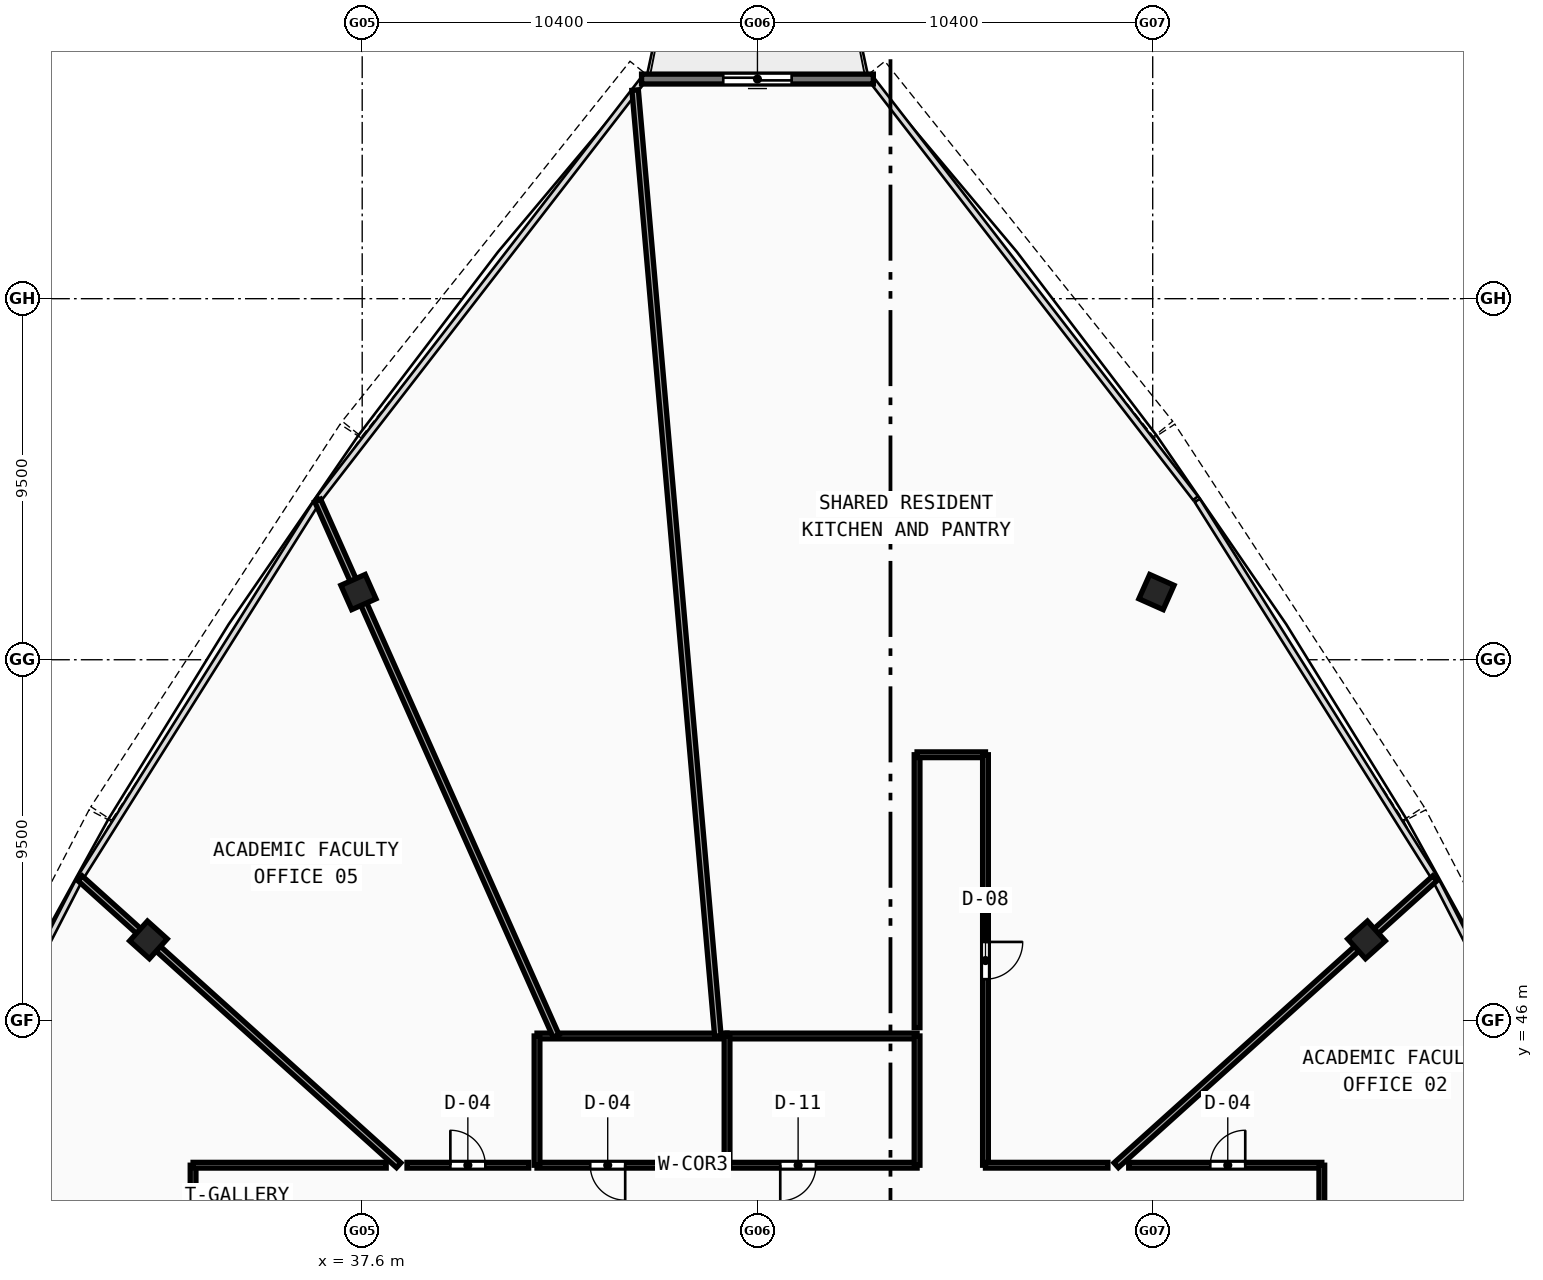
"""IFC4 building model, lengths in metres.
Left out: names, types, materials, properties, quantities, classifications, styles, units other than length and angle.
Written with IfcOpenShell. Run it as: python <this file> out.ifc"""

import sys

from ifc_helpers import new_model, si_unit, direction, frame, frame_2d, origin, origin_with_axes, origin_2d, place, context, subcontext, project, spatial, rectangle, hollow_rectangle, extrude, source, transform, mapped, element, fill, save


model = new_model("IFC4")
c1 = context("Model", 3, precision=1e-05, world=origin(), true_north=direction((0.0, 1.0)))
c2 = subcontext(c1, "Body", "Model", "MODEL_VIEW")
j1 = project(units=[si_unit("LENGTHUNIT", "METRE"), si_unit("PLANEANGLEUNIT", "RADIAN")], contexts=[c1])
p1 = place(None, origin())
s1 = spatial("IfcSite", under=j1, at=p1, CompositionType="ELEMENT")
p2 = place(p1, origin())
s2 = spatial("IfcBuilding", under=s1, at=p2, CompositionType="ELEMENT")
p3 = place(p2, frame((0.0, 0.0, 348.01)))
s3 = spatial("IfcBuildingStorey", under=s2, at=p3, CompositionType="ELEMENT", Elevation=348.01)
m1 = source(origin(), c2, "Body", "SweptSolid", [
    extrude(hollow_rectangle(XDim=0.7, YDim=0.7, WallThickness=0.026, at=origin_2d()), origin(), (0.0, 0.0, 1.0), 3.75),
])
for number, where, z_axis, x_axis in (
    (1, (64.025, 48.129, -0.26), (0.0, 0.0, 1.0), (-0.669, 0.743, 0.0)),
    (2, (58.499, 57.281, -0.26), (0.0, 0.0, 1.0), (-0.914, 0.407, 0.0)),
    (3, (37.501, 57.281, -0.26), (0.0, 0.0, 1.0), (-0.914, -0.407, 0.0)),
    (4, (31.975, 48.129, -0.26), (0.0, 0.0, 1.0), (-0.669, -0.743, 0.0)),
):
    element("IfcColumn", number, at=place(p3, frame(where, z_axis=z_axis, x_axis=x_axis)), inside=s3, PredefinedType="COLUMN", context=c2, shape_type="MappedRepresentation", body=[
        mapped(m1, transform((0.0, 0.0, 0.0), scale=1.0)),
    ])
p4 = place(p3, frame((51.049, 70.779, 0.0), z_axis=(0.0, 0.0, 1.0), x_axis=(-1.0, 0.0, 0.0)))
e5 = element("IfcWall", 5, at=p4, inside=s3, PredefinedType="STANDARD", context=c2, shape_type="SweptSolid", body=[
    extrude(rectangle(XDim=6.099, YDim=0.26, at=frame_2d((3.049, 0.0))), origin(), (0.0, 0.0, 1.0), 3.49),
])
p5 = place(p4, frame((2.149, 0.0, 0.0)))
e6 = element("IfcOpeningElement", 6, at=p5, cuts=e5, PredefinedType="OPENING", context=c2, shape_type="SweptSolid", body=[
    extrude(rectangle(XDim=1.8, YDim=2.15, at=frame_2d((0.9, 1.075))), frame((0.0, 0.14, 0.0), z_axis=(0.0, -1.0, 0.0), x_axis=(1.0, 0.0, 0.0)), (0.0, 0.0, 1.0), 0.28),
])
p6 = place(p3, frame((42.2, 42.2, 0.0), z_axis=(0.0, 0.0, 1.0), x_axis=(1.0, 0.0, 0.0)))
e7 = element("IfcWall", 7, at=p6, inside=s3, PredefinedType="PARTITIONING", context=c2, shape_type="SweptSolid", body=[
    extrude(rectangle(XDim=5.0, YDim=0.15, at=frame_2d((2.5, 0.0))), origin(), (0.0, 0.0, 1.0), 2.89),
])
p7 = place(p6, frame((1.4, 0.0, 0.0)))
e8 = element("IfcOpeningElement", 8, at=p7, cuts=e7, PredefinedType="OPENING", context=c2, shape_type="SweptSolid", body=[
    extrude(rectangle(XDim=0.92, YDim=2.1, at=frame_2d((0.46, 1.05))), frame((0.0, 0.085, 0.0), z_axis=(0.0, -1.0, 0.0), x_axis=(1.0, 0.0, 0.0)), (0.0, 0.0, 1.0), 0.17),
])
p8 = place(p3, frame((42.2, 45.6, 0.0), z_axis=(0.0, 0.0, 1.0), x_axis=(1.0, 0.0, 0.0)))
e9 = element("IfcWall", 9, at=p8, inside=s3, PredefinedType="PARTITIONING", context=c2, shape_type="SweptSolid", body=[
    extrude(rectangle(XDim=5.0, YDim=0.15, at=frame_2d((2.5, 0.0))), origin(), (0.0, 0.0, 1.0), 2.89),
])
p9 = place(p3, frame((42.2, 42.2, 0.0), z_axis=(0.0, 0.0, 1.0), x_axis=(0.0, 1.0, 0.0)))
e10 = element("IfcWall", 10, at=p9, inside=s3, PredefinedType="PARTITIONING", context=c2, shape_type="SweptSolid", body=[
    extrude(rectangle(XDim=3.4, YDim=0.15, at=frame_2d((1.7, 0.0))), origin(), (0.0, 0.0, 1.0), 3.49),
])
p10 = place(p3, frame((47.2, 42.2, 0.0), z_axis=(0.0, 0.0, 1.0), x_axis=(1.0, 0.0, 0.0)))
e11 = element("IfcWall", 11, at=p10, inside=s3, PredefinedType="PARTITIONING", context=c2, shape_type="SweptSolid", body=[
    extrude(rectangle(XDim=5.0, YDim=0.15, at=frame_2d((2.5, 0.0))), origin(), (0.0, 0.0, 1.0), 2.89),
])
p11 = place(p10, frame((1.4, 0.0, 0.0)))
e12 = element("IfcOpeningElement", 12, at=p11, cuts=e11, PredefinedType="OPENING", context=c2, shape_type="SweptSolid", body=[
    extrude(rectangle(XDim=0.94, YDim=2.1, at=frame_2d((0.47, 1.05))), frame((0.0, 0.085, 0.0), z_axis=(0.0, -1.0, 0.0), x_axis=(1.0, 0.0, 0.0)), (0.0, 0.0, 1.0), 0.17),
])
p12 = place(p3, frame((47.2, 45.6, 0.0), z_axis=(0.0, 0.0, 1.0), x_axis=(1.0, 0.0, 0.0)))
e13 = element("IfcWall", 13, at=p12, inside=s3, PredefinedType="PARTITIONING", context=c2, shape_type="SweptSolid", body=[
    extrude(rectangle(XDim=5.0, YDim=0.15, at=frame_2d((2.5, 0.0))), origin(), (0.0, 0.0, 1.0), 3.49),
])
p13 = place(p3, frame((47.2, 42.2, 0.0), z_axis=(0.0, 0.0, 1.0), x_axis=(0.0, 1.0, 0.0)))
e14 = element("IfcWall", 14, at=p13, inside=s3, PredefinedType="PARTITIONING", context=c2, shape_type="SweptSolid", body=[
    extrude(rectangle(XDim=3.4, YDim=0.15, at=frame_2d((1.7, 0.0))), origin(), (0.0, 0.0, 1.0), 3.49),
])
p14 = place(p3, frame((52.2, 42.2, 0.0), z_axis=(0.0, 0.0, 1.0), x_axis=(0.0, 1.0, 0.0)))
e15 = element("IfcWall", 15, at=p14, inside=s3, PredefinedType="PARTITIONING", context=c2, shape_type="SweptSolid", body=[
    extrude(rectangle(XDim=3.4, YDim=0.15, at=frame_2d((1.7, 0.0))), origin(), (0.0, 0.0, 1.0), 2.89),
])
p15 = place(p3, frame((57.44, 42.2, 0.0), z_axis=(0.0, 0.0, 1.0), x_axis=(0.74314133574, 0.669134482085, 0.0)))
e16 = element("IfcWall", 16, at=p15, inside=s3, PredefinedType="PARTITIONING", context=c2, shape_type="SweptSolid", body=[
    extrude(rectangle(XDim=11.282, YDim=0.17, at=frame_2d((5.641, 0.0))), origin(), (0.0, 0.0, 1.0), 2.89),
])
p16 = place(p3, frame((46.959, 45.6, 0.0), z_axis=(0.0, 0.0, 1.0), x_axis=(-0.087155434332, 0.996194725075, 0.0)))
e17 = element("IfcWall", 17, at=p16, inside=s3, PredefinedType="PARTITIONING", context=c2, shape_type="SweptSolid", body=[
    extrude(rectangle(XDim=24.984, YDim=0.17, at=frame_2d((12.492, 0.0))), origin(), (0.0, 0.0, 1.0), 2.89),
])
p17 = place(p3, frame((42.702, 45.6, 0.0), z_axis=(0.0, 0.0, 1.0), x_axis=(-0.40675369263, 0.913537866501, 0.0)))
e18 = element("IfcWall", 18, at=p17, inside=s3, PredefinedType="PARTITIONING", context=c2, shape_type="SweptSolid", body=[
    extrude(rectangle(XDim=15.425, YDim=0.17, at=frame_2d((7.712, 0.0))), origin(), (0.0, 0.0, 1.0), 2.89),
])
p18 = place(p3, frame((38.56, 42.2, 0.0), z_axis=(0.0, 0.0, 1.0), x_axis=(-0.74314133574, 0.669134482085, 0.0)))
e19 = element("IfcWall", 19, at=p18, inside=s3, PredefinedType="PARTITIONING", context=c2, shape_type="SweptSolid", body=[
    extrude(rectangle(XDim=11.282, YDim=0.17, at=frame_2d((5.641, 0.0))), origin(), (0.0, 0.0, 1.0), 2.89),
])
p19 = place(p3, frame((33.15, 31.301, 0.0), z_axis=(0.0, 0.0, 1.0), x_axis=(0.0, 1.0, 0.0)))
e20 = element("IfcWall", 20, at=p19, inside=s3, PredefinedType="PARTITIONING", context=c2, shape_type="SweptSolid", body=[
    extrude(rectangle(XDim=10.899, YDim=0.15, at=frame_2d((5.449, 0.0))), origin(), (0.0, 0.0, 1.0), 2.89),
])
p20 = place(p19, frame((5.094, 0.0, 0.0)))
e21 = element("IfcOpeningElement", 21, at=p20, cuts=e20, PredefinedType="OPENING", context=c2, shape_type="SweptSolid", body=[
    extrude(rectangle(XDim=0.98, YDim=2.12, at=frame_2d((0.49, 1.06))), frame((0.0, 0.085, 0.0), z_axis=(0.0, -1.0, 0.0), x_axis=(1.0, 0.0, 0.0)), (0.0, 0.0, 1.0), 0.17),
])
p21 = place(p3, frame((33.15, 42.2, 0.0), z_axis=(0.0, 0.0, 1.0), x_axis=(1.0, 0.0, 0.0)))
e22 = element("IfcWall", 22, at=p21, inside=s3, PredefinedType="PARTITIONING", context=c2, shape_type="SweptSolid", body=[
    extrude(rectangle(XDim=5.081, YDim=0.15, at=frame_2d((2.541, 0.0))), origin(), (0.0, 0.0, 1.0), 3.14),
])
p22 = place(p3, frame((38.78, 42.2, 0.0), z_axis=(0.0, 0.0, 1.0), x_axis=(1.0, 0.0, 0.0)))
e23 = element("IfcWall", 23, at=p22, inside=s3, PredefinedType="PARTITIONING", context=c2, shape_type="SweptSolid", body=[
    extrude(rectangle(XDim=3.2, YDim=0.15, at=frame_2d((1.6, 0.0))), origin(), (0.0, 0.0, 1.0), 2.89),
])
p23 = place(p22, frame((1.14, 0.0, 0.0)))
e24 = element("IfcOpeningElement", 24, at=p23, cuts=e23, PredefinedType="OPENING", context=c2, shape_type="SweptSolid", body=[
    extrude(rectangle(XDim=0.92, YDim=2.1, at=frame_2d((0.46, 1.05))), frame((0.0, 0.085, 0.0), z_axis=(0.0, -1.0, 0.0), x_axis=(1.0, 0.0, 0.0)), (0.0, 0.0, 1.0), 0.17),
])
p24 = place(p3, frame((52.2, 45.82, 0.0), z_axis=(0.0, 0.0, 1.0), x_axis=(0.0, 1.0, 0.0)))
e25 = element("IfcWall", 25, at=p24, inside=s3, PredefinedType="PARTITIONING", context=c2, shape_type="SweptSolid", body=[
    extrude(rectangle(XDim=7.18, YDim=0.15, at=frame_2d((3.59, 0.0))), origin(), (0.0, 0.0, 1.0), 3.14),
])
p25 = place(p3, frame((52.2, 53.0, 0.0), z_axis=(0.0, 0.0, 1.0), x_axis=(1.0, 0.0, 0.0)))
e26 = element("IfcWall", 26, at=p25, inside=s3, PredefinedType="PARTITIONING", context=c2, shape_type="SweptSolid", body=[
    extrude(rectangle(XDim=1.8, YDim=0.15, at=frame_2d((0.9, 0.0))), origin(), (0.0, 0.0, 1.0), 3.49),
])
p26 = place(p3, frame((54.0, 53.0, 0.0), z_axis=(0.0, 0.0, 1.0), x_axis=(0.0, -1.0, 0.0)))
e27 = element("IfcWall", 27, at=p26, inside=s3, PredefinedType="PARTITIONING", context=c2, shape_type="SweptSolid", body=[
    extrude(rectangle(XDim=10.8, YDim=0.15, at=frame_2d((5.4, 0.0))), origin(), (0.0, 0.0, 1.0), 2.89),
])
p27 = place(p26, frame((4.925, 0.0, 0.0)))
e28 = element("IfcOpeningElement", 28, at=p27, cuts=e27, PredefinedType="OPENING", context=c2, shape_type="SweptSolid", body=[
    extrude(rectangle(XDim=0.98, YDim=2.12, at=frame_2d((0.49, 1.06))), frame((0.0, 0.085, 0.0), z_axis=(0.0, -1.0, 0.0), x_axis=(1.0, 0.0, 0.0)), (0.0, 0.0, 1.0), 0.17),
])
p28 = place(p3, frame((54.0, 42.2, 0.0), z_axis=(0.0, 0.0, 1.0), x_axis=(1.0, 0.0, 0.0)))
e29 = element("IfcWall", 29, at=p28, inside=s3, PredefinedType="PARTITIONING", context=c2, shape_type="SweptSolid", body=[
    extrude(rectangle(XDim=3.22, YDim=0.15, at=frame_2d((1.61, 0.0))), origin(), (0.0, 0.0, 1.0), 2.89),
])
p29 = place(p3, frame((57.769, 42.2, 0.0), z_axis=(0.0, 0.0, 1.0), x_axis=(1.0, 0.0, 0.0)))
e30 = element("IfcWall", 30, at=p29, inside=s3, PredefinedType="PARTITIONING", context=c2, shape_type="SweptSolid", body=[
    extrude(rectangle(XDim=5.081, YDim=0.15, at=frame_2d((2.541, 0.0))), origin(), (0.0, 0.0, 1.0), 3.14),
])
p30 = place(p29, frame((2.146, 0.0, 0.0)))
e31 = element("IfcOpeningElement", 31, at=p30, cuts=e30, PredefinedType="OPENING", context=c2, shape_type="SweptSolid", body=[
    extrude(rectangle(XDim=0.92, YDim=2.1, at=frame_2d((0.46, 1.05))), frame((0.0, 0.085, 0.0), z_axis=(0.0, -1.0, 0.0), x_axis=(1.0, 0.0, 0.0)), (0.0, 0.0, 1.0), 0.17),
])
p31 = place(p3, frame((62.85, 42.2, 0.0), z_axis=(0.0, 0.0, 1.0), x_axis=(0.0, -1.0, 0.0)))
e32 = element("IfcWall", 32, at=p31, inside=s3, PredefinedType="PARTITIONING", context=c2, shape_type="SweptSolid", body=[
    extrude(rectangle(XDim=3.444, YDim=0.15, at=frame_2d((1.722, 0.0))), origin(), (0.0, 0.0, 1.0), 3.14),
])
m2 = source(origin(), c2, "Body", "SweptSolid", [
    extrude(rectangle(XDim=1.8, YDim=2.15, at=frame_2d((0.9, 1.075))), frame((0.0, 0.025, 0.0), z_axis=(0.0, -1.0, 0.0), x_axis=(1.0, 0.0, 0.0)), (0.0, 0.0, 1.0), 0.05),
])
p32 = place(p5, origin_with_axes())
e33 = element("IfcDoor", 33, at=p32, inside=s3, OperationType="DOUBLE_DOOR_SLIDING", PredefinedType="DOOR", context=c2, shape_type="MappedRepresentation", body=[
    mapped(m2, transform((0.0, 0.0, 0.0), scale=1.0)),
])
fill(e6, e33)
m3 = source(origin(), c2, "Body", "SweptSolid", [
    extrude(rectangle(XDim=0.92, YDim=2.1, at=frame_2d((0.46, 1.05))), frame((0.0, 0.025, 0.0), z_axis=(0.0, -1.0, 0.0), x_axis=(1.0, 0.0, 0.0)), (0.0, 0.0, 1.0), 0.05),
])
p33 = place(p7, frame((0.92, 0.0, 0.0), z_axis=(0.0, 0.0, 1.0), x_axis=(-1.0, 0.0, 0.0)))
e34 = element("IfcDoor", 34, at=p33, inside=s3, OperationType="SINGLE_SWING_LEFT", PredefinedType="DOOR", context=c2, shape_type="MappedRepresentation", body=[
    mapped(m3, transform((0.0, 0.0, 0.0), scale=1.0)),
])
fill(e8, e34)
m4 = source(origin(), c2, "Body", "SweptSolid", [
    extrude(rectangle(XDim=0.94, YDim=2.1, at=frame_2d((0.47, 1.05))), frame((0.0, 0.025, 0.0), z_axis=(0.0, -1.0, 0.0), x_axis=(1.0, 0.0, 0.0)), (0.0, 0.0, 1.0), 0.05),
])
p34 = place(p11, frame((0.94, 0.0, 0.0), z_axis=(0.0, 0.0, 1.0), x_axis=(-1.0, 0.0, 0.0)))
e35 = element("IfcDoor", 35, at=p34, inside=s3, OperationType="SINGLE_SWING_RIGHT", PredefinedType="DOOR", context=c2, shape_type="MappedRepresentation", body=[
    mapped(m4, transform((0.0, 0.0, 0.0), scale=1.0)),
])
fill(e12, e35)
p35 = place(p30, origin_with_axes())
e36 = element("IfcDoor", 36, at=p35, inside=s3, OperationType="SINGLE_SWING_RIGHT", PredefinedType="DOOR", context=c2, shape_type="MappedRepresentation", body=[
    mapped(m3, transform((0.0, 0.0, 0.0), scale=1.0)),
])
fill(e31, e36)
m5 = source(origin(), c2, "Body", "SweptSolid", [
    extrude(rectangle(XDim=0.98, YDim=2.12, at=frame_2d((0.49, 1.06))), frame((0.0, 0.025, 0.0), z_axis=(0.0, -1.0, 0.0), x_axis=(1.0, 0.0, 0.0)), (0.0, 0.0, 1.0), 0.05),
])
p36 = place(p27, origin_with_axes())
e37 = element("IfcDoor", 37, at=p36, inside=s3, OperationType="SINGLE_SWING_LEFT", PredefinedType="DOOR", context=c2, shape_type="MappedRepresentation", body=[
    mapped(m5, transform((0.0, 0.0, 0.0), scale=1.0)),
])
fill(e28, e37)
p37 = place(p23, origin_with_axes())
e38 = element("IfcDoor", 38, at=p37, inside=s3, OperationType="SINGLE_SWING_LEFT", PredefinedType="DOOR", context=c2, shape_type="MappedRepresentation", body=[
    mapped(m3, transform((0.0, 0.0, 0.0), scale=1.0)),
])
fill(e24, e38)
save(model, sys.argv[1])
